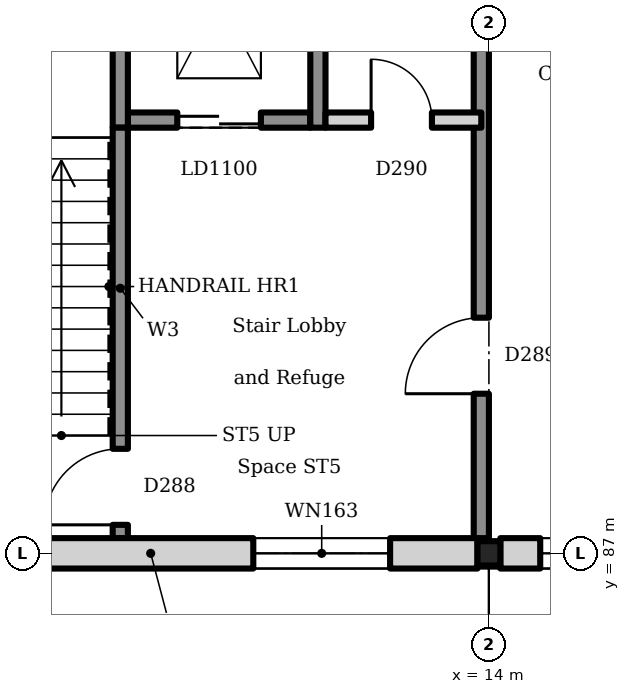
"""IFC4 building model, lengths in metres.
Left out: names, types, materials, properties, quantities, classifications, styles, units other than length and angle.
Written with IfcOpenShell. Run it as: python <this file> out.ifc"""

import sys

from ifc_helpers import new_model, si_unit, direction, frame, frame_2d, origin, origin_2d, place, context, subcontext, project, spatial, rectangle, i_section, extrude, element, fill, save


model = new_model("IFC4")
c1 = context("Model", 3, precision=1e-05, world=origin(), true_north=direction((0.0, 1.0)))
c2 = subcontext(c1, "Body", "Model", "MODEL_VIEW")
j1 = project(units=[si_unit("LENGTHUNIT", "METRE"), si_unit("PLANEANGLEUNIT", "RADIAN")], contexts=[c1])
p1 = place(None, origin())
s1 = spatial("IfcSite", under=j1, at=p1, CompositionType="ELEMENT")
p2 = place(p1, origin())
s2 = spatial("IfcBuilding", under=s1, at=p2, CompositionType="ELEMENT")
p3 = place(p2, origin())
s3 = spatial("IfcBuildingStorey", under=s2, at=p3, CompositionType="ELEMENT", Elevation=0.0)
p4 = place(p3, frame((9.25, 92.7, -1.1), z_axis=(0.0, 0.0, 1.0), x_axis=(1.0, 0.0, 0.0)))
e1 = element("IfcWall", 1, at=p4, inside=s3, PredefinedType="SOLIDWALL", context=c2, shape_type="SweptSolid", body=[
    extrude(rectangle(XDim=2.4, YDim=0.2, at=frame_2d((1.2, 0.0))), origin(), (0.0, 0.0, 1.0), 6.5),
])
p5 = place(p4, frame((0.65, 0.0, 1.1)))
e2 = element("IfcOpeningElement", 2, at=p5, cuts=e1, PredefinedType="OPENING", context=c2, shape_type="SweptSolid", body=[
    extrude(rectangle(XDim=1.1, YDim=2.1, at=frame_2d((0.55, 1.05))), frame((0.0, 0.11, 0.0), z_axis=(0.0, -1.0, 0.0), x_axis=(1.0, 0.0, 0.0)), (0.0, 0.0, 1.0), 0.22),
])
for number, where, z_axis, x_axis in (
    (3, (9.15, 92.6, -1.1), (0.0, 0.0, 1.0), (0.0, 1.0, 0.0)),
    (4, (11.75, 92.6, -1.1), (0.0, 0.0, 1.0), (0.0, 1.0, 0.0)),
):
    element("IfcWall", number, at=place(p3, frame(where, z_axis=z_axis, x_axis=x_axis)), inside=s3, PredefinedType="SOLIDWALL", context=c2, shape_type="SweptSolid", body=[
        extrude(rectangle(XDim=3.4, YDim=0.2, at=frame_2d((1.7, 0.0))), origin(), (0.0, 0.0, 1.0), 6.5),
    ])
p6 = place(p3, frame((14.0, 87.0, 0.0), z_axis=(0.0, 0.0, 1.0), x_axis=(1.0, 0.0, 0.0)))
e5 = element("IfcColumn", 5, at=p6, inside=s3, PredefinedType="COLUMN", context=c2, shape_type="SweptSolid", body=[
    extrude(i_section(OverallWidth=0.3, OverallDepth=0.32, WebThickness=0.011, FlangeThickness=0.021, FilletRadius=0.027, at=origin_2d()), origin(), (0.0, 0.0, 1.0), 5.4),
])
p7 = place(p3, frame((6.15, 87.0, -0.3), z_axis=(0.0, 0.0, 1.0), x_axis=(1.0, 0.0, 0.0)))
e6 = element("IfcWall", 6, at=p7, inside=s3, PredefinedType="SOLIDWALL", context=c2, shape_type="SweptSolid", body=[
    extrude(rectangle(XDim=7.7, YDim=0.4, at=frame_2d((3.85, 0.0))), origin(), (0.0, 0.0, 1.0), 5.13),
])
p8 = place(p7, frame((0.85, 0.0, 0.3)))
e7 = element("IfcOpeningElement", 7, at=p8, cuts=e6, PredefinedType="OPENING", context=c2, shape_type="SweptSolid", body=[
    extrude(rectangle(XDim=1.2, YDim=2.4, at=frame_2d((0.6, 1.2))), frame((0.0, 0.21, 0.0), z_axis=(0.0, -1.0, 0.0), x_axis=(1.0, 0.0, 0.0)), (0.0, 0.0, 1.0), 0.42),
])
p9 = place(p7, frame((4.75, 0.0, 0.45)))
e8 = element("IfcOpeningElement", 8, at=p9, cuts=e6, PredefinedType="OPENING", context=c2, shape_type="SweptSolid", body=[
    extrude(rectangle(XDim=1.8, YDim=3.6, at=frame_2d((0.9, 1.8))), frame((0.0, 0.21, 0.0), z_axis=(0.0, -1.0, 0.0), x_axis=(1.0, 0.0, 0.0)), (0.0, 0.0, 1.0), 0.42),
])
p10 = place(p3, frame((14.15, 87.0, -0.3), z_axis=(0.0, 0.0, 1.0), x_axis=(1.0, 0.0, 0.0)))
e9 = element("IfcWall", 9, at=p10, inside=s3, PredefinedType="SOLIDWALL", context=c2, shape_type="SweptSolid", body=[
    extrude(rectangle(XDim=7.7, YDim=0.4, at=frame_2d((3.85, 0.0))), origin(), (0.0, 0.0, 1.0), 5.13),
])
p11 = place(p10, frame((0.525, 0.0, 0.45)))
e10 = element("IfcOpeningElement", 10, at=p11, cuts=e9, PredefinedType="OPENING", context=c2, shape_type="SweptSolid", body=[
    extrude(rectangle(XDim=1.8, YDim=3.6, at=frame_2d((0.9, 1.8))), frame((0.0, 0.21, 0.0), z_axis=(0.0, -1.0, 0.0), x_axis=(1.0, 0.0, 0.0)), (0.0, 0.0, 1.0), 0.42),
])
p12 = place(p10, frame((2.95, 0.0, 0.45)))
e11 = element("IfcOpeningElement", 11, at=p12, cuts=e9, PredefinedType="OPENING", context=c2, shape_type="SweptSolid", body=[
    extrude(rectangle(XDim=1.8, YDim=3.6, at=frame_2d((0.9, 1.8))), frame((0.0, 0.21, 0.0), z_axis=(0.0, -1.0, 0.0), x_axis=(1.0, 0.0, 0.0)), (0.0, 0.0, 1.0), 0.42),
])
p13 = place(p10, frame((5.325, 0.0, 0.45)))
e12 = element("IfcOpeningElement", 12, at=p13, cuts=e9, PredefinedType="OPENING", context=c2, shape_type="SweptSolid", body=[
    extrude(rectangle(XDim=1.8, YDim=3.6, at=frame_2d((0.9, 1.8))), frame((0.0, 0.21, 0.0), z_axis=(0.0, -1.0, 0.0), x_axis=(1.0, 0.0, 0.0)), (0.0, 0.0, 1.0), 0.42),
])
p14 = place(p3, frame((9.15, 87.2, 0.0), z_axis=(0.0, 0.0, 1.0), x_axis=(0.0, 1.0, 0.0)))
e13 = element("IfcWall", 13, at=p14, inside=s3, PredefinedType="SOLIDWALL", context=c2, shape_type="SweptSolid", body=[
    extrude(rectangle(XDim=5.4, YDim=0.2, at=frame_2d((2.7, 0.0))), origin(), (0.0, 0.0, 1.0), 5.25),
])
p15 = place(p14, frame((0.175, 0.0, 0.0)))
e14 = element("IfcOpeningElement", 14, at=p15, cuts=e13, PredefinedType="OPENING", context=c2, shape_type="SweptSolid", body=[
    extrude(rectangle(XDim=1.0, YDim=2.1, at=frame_2d((0.5, 1.05))), frame((0.0, 0.11, 0.0), z_axis=(0.0, -1.0, 0.0), x_axis=(1.0, 0.0, 0.0)), (0.0, 0.0, 1.0), 0.22),
])
p16 = place(p3, frame((11.85, 92.7, 0.0), z_axis=(0.0, 0.0, 1.0), x_axis=(1.0, 0.0, 0.0)))
e15 = element("IfcWall", 15, at=p16, inside=s3, PredefinedType="SOLIDWALL", context=c2, shape_type="SweptSolid", body=[
    extrude(rectangle(XDim=2.05, YDim=0.2, at=frame_2d((1.025, 0.0))), origin(), (0.0, 0.0, 1.0), 4.81),
])
p17 = place(p16, frame((0.6, 0.0, 0.0)))
e16 = element("IfcOpeningElement", 16, at=p17, cuts=e15, PredefinedType="OPENING", context=c2, shape_type="SweptSolid", body=[
    extrude(rectangle(XDim=0.8, YDim=2.1, at=frame_2d((0.4, 1.05))), frame((0.0, 0.11, 0.0), z_axis=(0.0, -1.0, 0.0), x_axis=(1.0, 0.0, 0.0)), (0.0, 0.0, 1.0), 0.22),
])
p18 = place(p3, frame((13.9, 87.2, 0.0), z_axis=(0.0, 0.0, 1.0), x_axis=(0.0, 1.0, 0.0)))
e17 = element("IfcWall", 17, at=p18, inside=s3, PredefinedType="SOLIDWALL", context=c2, shape_type="SweptSolid", body=[
    extrude(rectangle(XDim=8.8, YDim=0.2, at=frame_2d((4.4, 0.0))), origin(), (0.0, 0.0, 1.0), 4.81),
])
p19 = place(p18, frame((1.9, 0.0, 0.0)))
e18 = element("IfcOpeningElement", 18, at=p19, cuts=e17, PredefinedType="OPENING", context=c2, shape_type="SweptSolid", body=[
    extrude(rectangle(XDim=1.0, YDim=2.1, at=frame_2d((0.5, 1.05))), frame((0.0, 0.11, 0.0), z_axis=(0.0, -1.0, 0.0), x_axis=(1.0, 0.0, 0.0)), (0.0, 0.0, 1.0), 0.22),
])
p20 = place(p5, origin())
e19 = element("IfcDoor", 19, at=p20, inside=s3, OperationType="SLIDING_TO_LEFT", PredefinedType="DOOR", context=c2, shape_type="SweptSolid", body=[
    extrude(rectangle(XDim=1.1, YDim=2.1, at=frame_2d((0.55, 1.05))), frame((0.0, 0.025, 0.0), z_axis=(0.0, -1.0, 0.0), x_axis=(1.0, 0.0, 0.0)), (0.0, 0.0, 1.0), 0.05),
])
fill(e2, e19)
p21 = place(p9, origin())
e20 = element("IfcWindow", 20, at=p21, inside=s3, PartitioningType="SINGLE_PANEL", PredefinedType="WINDOW", context=c2, shape_type="SweptSolid", body=[
    extrude(rectangle(XDim=1.8, YDim=3.6, at=frame_2d((0.9, 1.8))), frame((0.0, 0.03, 0.0), z_axis=(0.0, -1.0, 0.0), x_axis=(1.0, 0.0, 0.0)), (0.0, 0.0, 1.0), 0.06),
])
fill(e8, e20)
p22 = place(p11, origin())
e21 = element("IfcWindow", 21, at=p22, inside=s3, PartitioningType="SINGLE_PANEL", PredefinedType="WINDOW", context=c2, shape_type="SweptSolid", body=[
    extrude(rectangle(XDim=1.8, YDim=3.6, at=frame_2d((0.9, 1.8))), frame((0.0, 0.03, 0.0), z_axis=(0.0, -1.0, 0.0), x_axis=(1.0, 0.0, 0.0)), (0.0, 0.0, 1.0), 0.06),
])
fill(e10, e21)
p23 = place(p15, origin())
e22 = element("IfcDoor", 22, at=p23, inside=s3, OperationType="SINGLE_SWING_RIGHT", PredefinedType="DOOR", context=c2, shape_type="SweptSolid", body=[
    extrude(rectangle(XDim=1.0, YDim=2.1, at=frame_2d((0.5, 1.05))), frame((0.0, 0.025, 0.0), z_axis=(0.0, -1.0, 0.0), x_axis=(1.0, 0.0, 0.0)), (0.0, 0.0, 1.0), 0.05),
])
fill(e14, e22)
p24 = place(p19, origin())
e23 = element("IfcDoor", 23, at=p24, inside=s3, OperationType="SINGLE_SWING_RIGHT", PredefinedType="DOOR", context=c2, shape_type="SweptSolid", body=[
    extrude(rectangle(XDim=1.0, YDim=2.1, at=frame_2d((0.5, 1.05))), frame((0.0, 0.025, 0.0), z_axis=(0.0, -1.0, 0.0), x_axis=(1.0, 0.0, 0.0)), (0.0, 0.0, 1.0), 0.05),
])
fill(e18, e23)
p25 = place(p17, origin())
e24 = element("IfcDoor", 24, at=p25, inside=s3, OperationType="SINGLE_SWING_RIGHT", PredefinedType="DOOR", context=c2, shape_type="SweptSolid", body=[
    extrude(rectangle(XDim=0.8, YDim=2.1, at=frame_2d((0.4, 1.05))), frame((0.0, 0.025, 0.0), z_axis=(0.0, -1.0, 0.0), x_axis=(1.0, 0.0, 0.0)), (0.0, 0.0, 1.0), 0.05),
])
fill(e16, e24)
save(model, sys.argv[1])
